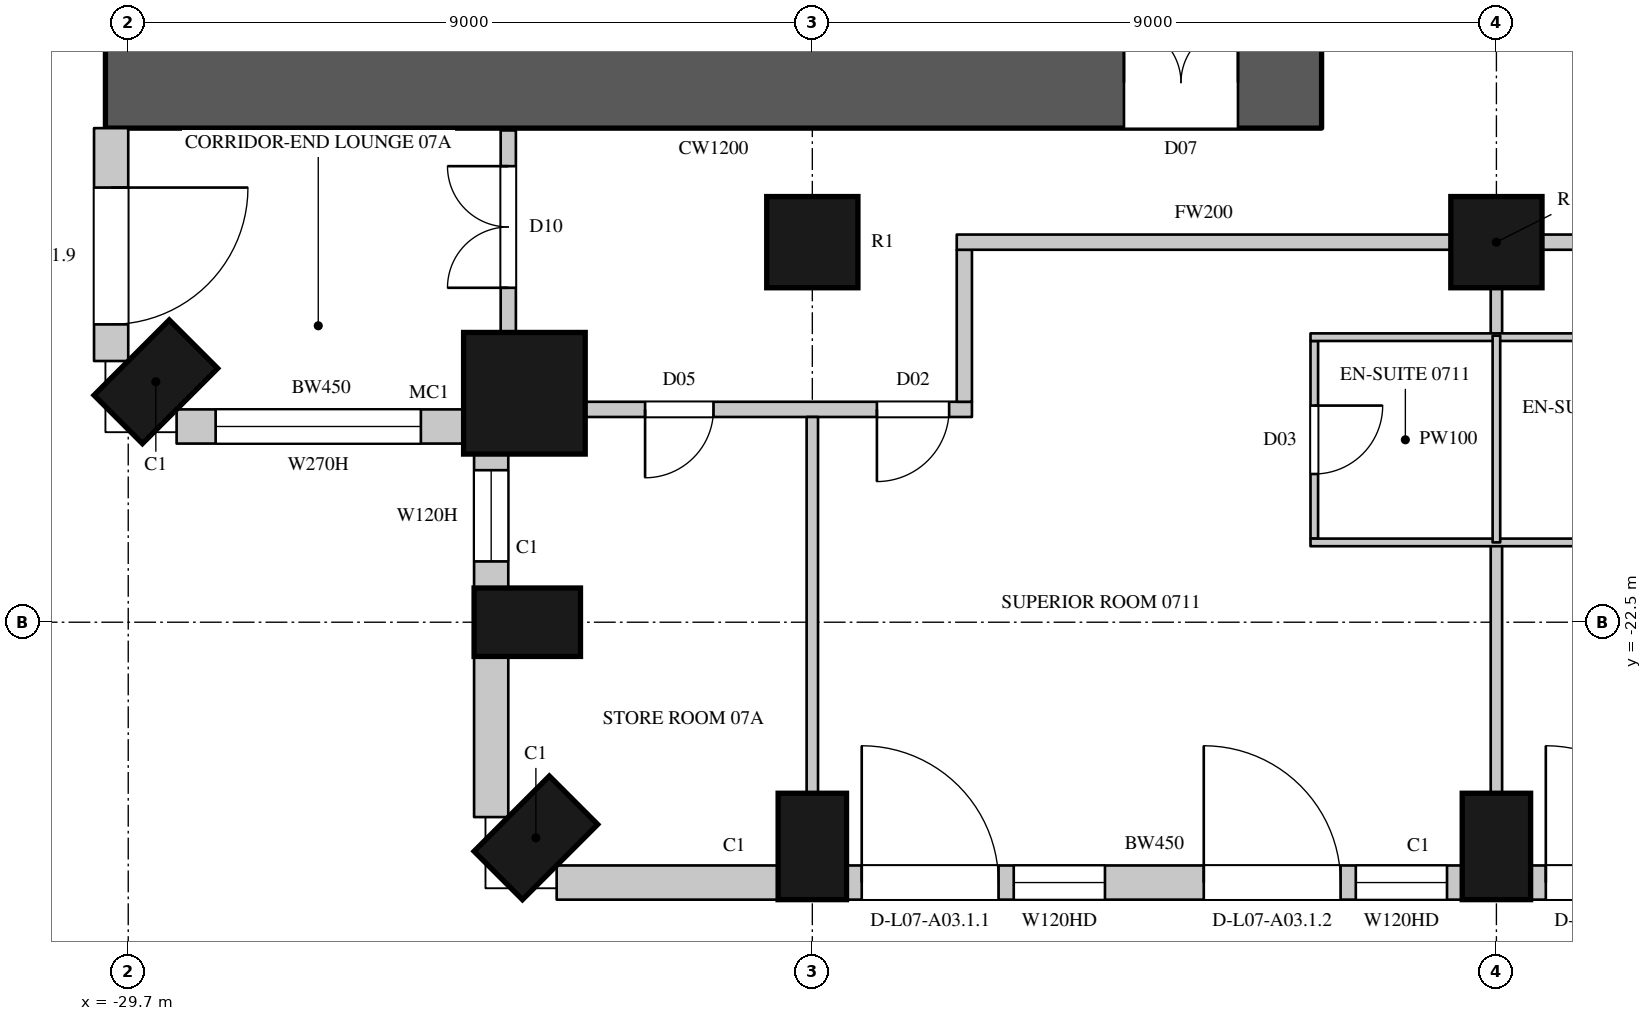
"""IFC4 building model, lengths in metres.
Left out: names, types, materials, properties, quantities, classifications, styles, units other than length and angle.
Written with IfcOpenShell. Run it as: python <this file> out.ifc"""

import sys

from ifc_helpers import new_model, si_unit, direction, frame, frame_2d, origin, origin_2d, place, context, subcontext, project, spatial, rectangle, circle, extrude, element, fill, save


model = new_model("IFC4")
c1 = context("Model", 3, precision=1e-05, world=origin(), true_north=direction((0.0, 1.0)))
c2 = subcontext(c1, "Body", "Model", "MODEL_VIEW")
j1 = project(units=[si_unit("LENGTHUNIT", "METRE"), si_unit("PLANEANGLEUNIT", "RADIAN")], contexts=[c1])
p1 = place(None, origin())
s1 = spatial("IfcSite", under=j1, at=p1, CompositionType="ELEMENT")
p2 = place(p1, origin())
s2 = spatial("IfcBuilding", under=s1, at=p2, CompositionType="ELEMENT")
p3 = place(p2, frame((0.0, 0.0, 55.5)))
s3 = spatial("IfcBuildingStorey", under=s2, at=p3, CompositionType="ELEMENT", Elevation=55.5)
p4 = place(p3, frame((-29.337, -19.337, 0.0), z_axis=(0.0, 0.0, 1.0), x_axis=(0.707106781187, -0.707106781187, 0.0)))
e1 = element("IfcColumn", 1, at=p4, inside=s3, PredefinedType="COLUMN", context=c2, shape_type="SweptSolid", body=[
    extrude(rectangle(XDim=0.9, YDim=1.4, at=origin_2d()), origin(), (0.0, 0.0, 1.0), 3.6),
])
p5 = place(p3, frame((-24.488, -19.488, 0.0), z_axis=(0.0, 0.0, 1.0), x_axis=(1.0, 0.0, 0.0)))
e2 = element("IfcColumn", 2, at=p5, inside=s3, PredefinedType="COLUMN", context=c2, shape_type="SweptSolid", body=[
    extrude(circle(Radius=0.8, at=origin_2d()), origin(), (0.0, 0.0, 1.0), 3.6),
])
for number, where, z_axis, x_axis in (
    (3, (-24.45, -22.5, 0.0), (0.0, 0.0, 1.0), (0.0, -1.0, 0.0)),
    (4, (-24.337, -25.337, 0.0), (0.0, 0.0, 1.0), (0.707, -0.707, 0.0)),
    (5, (-20.7, -25.45, 0.0), (0.0, 0.0, 1.0), (1.0, 0.0, 0.0)),
    (6, (-11.7, -25.45, 0.0), (0.0, 0.0, 1.0), (1.0, 0.0, 0.0)),
):
    element("IfcColumn", number, at=place(p3, frame(where, z_axis=z_axis, x_axis=x_axis)), inside=s3, PredefinedType="COLUMN", context=c2, shape_type="SweptSolid", body=[
        extrude(rectangle(XDim=0.9, YDim=1.4, at=origin_2d()), origin(), (0.0, 0.0, 1.0), 3.6),
    ])
for number, where, z_axis, x_axis in (
    (7, (-20.7, -17.5, 0.0), (0.0, 0.0, 1.0), (1.0, 0.0, 0.0)),
    (8, (-11.7, -17.5, 0.0), (0.0, 0.0, 1.0), (1.0, 0.0, 0.0)),
):
    element("IfcColumn", number, at=place(p3, frame(where, z_axis=z_axis, x_axis=x_axis)), inside=s3, PredefinedType="COLUMN", context=c2, shape_type="SweptSolid", body=[
        extrude(circle(Radius=0.6, at=origin_2d()), origin(), (0.0, 0.0, 1.0), 3.6),
    ])
p6 = place(p3, frame((-29.925, -16.0, 0.0), z_axis=(0.0, 0.0, 1.0), x_axis=(0.0, -1.0, 0.0)))
e9 = element("IfcWall", 9, at=p6, inside=s3, PredefinedType="SOLIDWALL", context=c2, shape_type="SweptSolid", body=[
    extrude(rectangle(XDim=3.064, YDim=0.45, at=frame_2d((1.532, 0.0))), origin(), (0.0, 0.0, 1.0), 3.3),
])
p7 = place(p6, frame((0.782, 0.0, 0.0)))
e10 = element("IfcOpeningElement", 10, at=p7, cuts=e9, PredefinedType="OPENING", context=c2, shape_type="SweptSolid", body=[
    extrude(rectangle(XDim=1.8, YDim=2.4, at=frame_2d((0.9, 1.2))), frame((0.0, 0.235, 0.0), z_axis=(0.0, -1.0, 0.0), x_axis=(1.0, 0.0, 0.0)), (0.0, 0.0, 1.0), 0.47),
])
p8 = place(p3, frame((-29.064, -19.925, 0.0), z_axis=(0.0, 0.0, 1.0), x_axis=(1.0, 0.0, 0.0)))
e11 = element("IfcWall", 11, at=p8, inside=s3, PredefinedType="SOLIDWALL", context=c2, shape_type="SweptSolid", body=[
    extrude(rectangle(XDim=3.805, YDim=0.45, at=frame_2d((1.903, 0.0))), origin(), (0.0, 0.0, 1.0), 3.3),
])
p9 = place(p8, frame((0.514, 0.0, 1.05)))
e12 = element("IfcOpeningElement", 12, at=p9, cuts=e11, PredefinedType="OPENING", context=c2, shape_type="SweptSolid", body=[
    extrude(rectangle(XDim=2.7, YDim=2.0, at=frame_2d((1.35, 1.0))), frame((0.0, 0.235, 0.0), z_axis=(0.0, -1.0, 0.0), x_axis=(1.0, 0.0, 0.0)), (0.0, 0.0, 1.0), 0.47),
])
p10 = place(p3, frame((-24.925, -20.259, 0.0), z_axis=(0.0, 0.0, 1.0), x_axis=(0.0, -1.0, 0.0)))
e13 = element("IfcWall", 13, at=p10, inside=s3, PredefinedType="SOLIDWALL", context=c2, shape_type="SweptSolid", body=[
    extrude(rectangle(XDim=1.792, YDim=0.45, at=frame_2d((0.896, 0.0))), origin(), (0.0, 0.0, 1.0), 3.3),
])
p11 = place(p10, frame((0.241, 0.0, 1.05)))
e14 = element("IfcOpeningElement", 14, at=p11, cuts=e13, PredefinedType="OPENING", context=c2, shape_type="SweptSolid", body=[
    extrude(rectangle(XDim=1.2, YDim=2.0, at=frame_2d((0.6, 1.0))), frame((0.0, 0.235, 0.0), z_axis=(0.0, -1.0, 0.0), x_axis=(1.0, 0.0, 0.0)), (0.0, 0.0, 1.0), 0.47),
])
p12 = place(p3, frame((-24.925, -22.95, 0.0), z_axis=(0.0, 0.0, 1.0), x_axis=(0.0, -1.0, 0.0)))
e15 = element("IfcWall", 15, at=p12, inside=s3, PredefinedType="SOLIDWALL", context=c2, shape_type="SweptSolid", body=[
    extrude(rectangle(XDim=2.114, YDim=0.45, at=frame_2d((1.057, 0.0))), origin(), (0.0, 0.0, 1.0), 3.3),
])
p13 = place(p3, frame((-24.064, -25.925, 0.0), z_axis=(0.0, 0.0, 1.0), x_axis=(1.0, 0.0, 0.0)))
e16 = element("IfcWall", 16, at=p13, inside=s3, PredefinedType="SOLIDWALL", context=c2, shape_type="SweptSolid", body=[
    extrude(rectangle(XDim=2.914, YDim=0.45, at=frame_2d((1.457, 0.0))), origin(), (0.0, 0.0, 1.0), 3.3),
])
p14 = place(p3, frame((-20.25, -25.925, 0.0), z_axis=(0.0, 0.0, 1.0), x_axis=(1.0, 0.0, 0.0)))
e17 = element("IfcWall", 17, at=p14, inside=s3, PredefinedType="SOLIDWALL", context=c2, shape_type="SweptSolid", body=[
    extrude(rectangle(XDim=8.1, YDim=0.45, at=frame_2d((4.05, 0.0))), origin(), (0.0, 0.0, 1.0), 3.3),
])
p15 = place(p14, frame((0.2, 0.0, 0.0)))
e18 = element("IfcOpeningElement", 18, at=p15, cuts=e17, PredefinedType="OPENING", context=c2, shape_type="SweptSolid", body=[
    extrude(rectangle(XDim=1.8, YDim=2.4, at=frame_2d((0.9, 1.2))), frame((0.0, 0.235, 0.0), z_axis=(0.0, -1.0, 0.0), x_axis=(1.0, 0.0, 0.0)), (0.0, 0.0, 1.0), 0.47),
])
p16 = place(p14, frame((2.2, 0.0, 1.05)))
e19 = element("IfcOpeningElement", 19, at=p16, cuts=e17, PredefinedType="OPENING", context=c2, shape_type="SweptSolid", body=[
    extrude(rectangle(XDim=1.2, YDim=2.0, at=frame_2d((0.6, 1.0))), frame((0.0, 0.235, 0.0), z_axis=(0.0, -1.0, 0.0), x_axis=(1.0, 0.0, 0.0)), (0.0, 0.0, 1.0), 0.47),
])
p17 = place(p14, frame((4.7, 0.0, 0.0)))
e20 = element("IfcOpeningElement", 20, at=p17, cuts=e17, PredefinedType="OPENING", context=c2, shape_type="SweptSolid", body=[
    extrude(rectangle(XDim=1.8, YDim=2.4, at=frame_2d((0.9, 1.2))), frame((0.0, 0.235, 0.0), z_axis=(0.0, -1.0, 0.0), x_axis=(1.0, 0.0, 0.0)), (0.0, 0.0, 1.0), 0.47),
])
p18 = place(p14, frame((6.7, 0.0, 1.05)))
e21 = element("IfcOpeningElement", 21, at=p18, cuts=e17, PredefinedType="OPENING", context=c2, shape_type="SweptSolid", body=[
    extrude(rectangle(XDim=1.2, YDim=2.0, at=frame_2d((0.6, 1.0))), frame((0.0, 0.235, 0.0), z_axis=(0.0, -1.0, 0.0), x_axis=(1.0, 0.0, 0.0)), (0.0, 0.0, 1.0), 0.47),
])
p19 = place(p3, frame((-11.25, -25.925, 0.0), z_axis=(0.0, 0.0, 1.0), x_axis=(1.0, 0.0, 0.0)))
e22 = element("IfcWall", 22, at=p19, inside=s3, PredefinedType="SOLIDWALL", context=c2, shape_type="SweptSolid", body=[
    extrude(rectangle(XDim=8.1, YDim=0.45, at=frame_2d((4.05, 0.0))), origin(), (0.0, 0.0, 1.0), 3.3),
])
p20 = place(p19, frame((0.2, 0.0, 0.0)))
e23 = element("IfcOpeningElement", 23, at=p20, cuts=e22, PredefinedType="OPENING", context=c2, shape_type="SweptSolid", body=[
    extrude(rectangle(XDim=1.8, YDim=2.4, at=frame_2d((0.9, 1.2))), frame((0.0, 0.235, 0.0), z_axis=(0.0, -1.0, 0.0), x_axis=(1.0, 0.0, 0.0)), (0.0, 0.0, 1.0), 0.47),
])
p21 = place(p19, frame((2.2, 0.0, 1.05)))
e24 = element("IfcOpeningElement", 24, at=p21, cuts=e22, PredefinedType="OPENING", context=c2, shape_type="SweptSolid", body=[
    extrude(rectangle(XDim=1.2, YDim=2.0, at=frame_2d((0.6, 1.0))), frame((0.0, 0.235, 0.0), z_axis=(0.0, -1.0, 0.0), x_axis=(1.0, 0.0, 0.0)), (0.0, 0.0, 1.0), 0.47),
])
p22 = place(p19, frame((4.7, 0.0, 0.0)))
e25 = element("IfcOpeningElement", 25, at=p22, cuts=e22, PredefinedType="OPENING", context=c2, shape_type="SweptSolid", body=[
    extrude(rectangle(XDim=1.8, YDim=2.4, at=frame_2d((0.9, 1.2))), frame((0.0, 0.235, 0.0), z_axis=(0.0, -1.0, 0.0), x_axis=(1.0, 0.0, 0.0)), (0.0, 0.0, 1.0), 0.47),
])
p23 = place(p19, frame((6.7, 0.0, 1.05)))
e26 = element("IfcOpeningElement", 26, at=p23, cuts=e22, PredefinedType="OPENING", context=c2, shape_type="SweptSolid", body=[
    extrude(rectangle(XDim=1.2, YDim=2.0, at=frame_2d((0.6, 1.0))), frame((0.0, 0.235, 0.0), z_axis=(0.0, -1.0, 0.0), x_axis=(1.0, 0.0, 0.0)), (0.0, 0.0, 1.0), 0.47),
])
p24 = place(p3, frame((-30.0, -15.4, 0.0), z_axis=(0.0, 0.0, 1.0), x_axis=(1.0, 0.0, 0.0)))
e27 = element("IfcWall", 27, at=p24, inside=s3, PredefinedType="SHEAR", context=c2, shape_type="SweptSolid", body=[
    extrude(rectangle(XDim=16.0, YDim=1.2, at=frame_2d((8.0, 0.0))), origin(), (0.0, 0.0, 1.0), 3.6),
])
p25 = place(p24, frame((13.4, 0.0, 0.0)))
e28 = element("IfcOpeningElement", 28, at=p25, cuts=e27, PredefinedType="OPENING", context=c2, shape_type="SweptSolid", body=[
    extrude(rectangle(XDim=1.5, YDim=2.4, at=frame_2d((0.75, 1.2))), frame((0.0, 0.61, 0.0), z_axis=(0.0, -1.0, 0.0), x_axis=(1.0, 0.0, 0.0)), (0.0, 0.0, 1.0), 1.22),
])
p26 = place(p3, frame((-24.7, -18.7, 0.0), z_axis=(0.0, 0.0, 1.0), x_axis=(0.0, 1.0, 0.0)))
e29 = element("IfcWall", 29, at=p26, inside=s3, PredefinedType="PARTITIONING", context=c2, shape_type="SweptSolid", body=[
    extrude(rectangle(XDim=2.67, YDim=0.2, at=frame_2d((1.335, 0.0))), origin(), (0.0, 0.0, 1.0), 3.3),
])
p27 = place(p26, frame((0.6, 0.0, 0.0)))
e30 = element("IfcOpeningElement", 30, at=p27, cuts=e29, PredefinedType="OPENING", context=c2, shape_type="SweptSolid", body=[
    extrude(rectangle(XDim=1.6, YDim=2.4, at=frame_2d((0.8, 1.2))), frame((0.0, 0.11, 0.0), z_axis=(0.0, -1.0, 0.0), x_axis=(1.0, 0.0, 0.0)), (0.0, 0.0, 1.0), 0.22),
])
p28 = place(p3, frame((-23.7, -19.7, 0.0), z_axis=(0.0, 0.0, 1.0), x_axis=(1.0, 0.0, 0.0)))
e31 = element("IfcWall", 31, at=p28, inside=s3, PredefinedType="PARTITIONING", context=c2, shape_type="SweptSolid", body=[
    extrude(rectangle(XDim=5.1, YDim=0.2, at=frame_2d((2.55, 0.0))), origin(), (0.0, 0.0, 1.0), 3.3),
])
p29 = place(p28, frame((0.8, 0.0, 0.0)))
e32 = element("IfcOpeningElement", 32, at=p29, cuts=e31, PredefinedType="OPENING", context=c2, shape_type="SweptSolid", body=[
    extrude(rectangle(XDim=0.9, YDim=2.2, at=frame_2d((0.45, 1.1))), frame((0.0, 0.11, 0.0), z_axis=(0.0, -1.0, 0.0), x_axis=(1.0, 0.0, 0.0)), (0.0, 0.0, 1.0), 0.22),
])
p30 = place(p28, frame((3.85, 0.0, 0.0)))
e33 = element("IfcOpeningElement", 33, at=p30, cuts=e31, PredefinedType="OPENING", context=c2, shape_type="SweptSolid", body=[
    extrude(rectangle(XDim=0.95, YDim=2.2, at=frame_2d((0.475, 1.1))), frame((0.0, 0.11, 0.0), z_axis=(0.0, -1.0, 0.0), x_axis=(1.0, 0.0, 0.0)), (0.0, 0.0, 1.0), 0.22),
])
p31 = place(p3, frame((-18.7, -19.6, 0.0), z_axis=(0.0, 0.0, 1.0), x_axis=(0.0, 1.0, 0.0)))
e34 = element("IfcWall", 34, at=p31, inside=s3, PredefinedType="PARTITIONING", context=c2, shape_type="SweptSolid", body=[
    extrude(rectangle(XDim=2.0, YDim=0.2, at=frame_2d((1.0, 0.0))), origin(), (0.0, 0.0, 1.0), 3.3),
])
p32 = place(p3, frame((-18.8, -17.5, 0.0), z_axis=(0.0, 0.0, 1.0), x_axis=(1.0, 0.0, 0.0)))
e35 = element("IfcWall", 35, at=p32, inside=s3, PredefinedType="PARTITIONING", context=c2, shape_type="SweptSolid", body=[
    extrude(rectangle(XDim=6.5, YDim=0.2, at=frame_2d((3.25, 0.0))), origin(), (0.0, 0.0, 1.0), 2.75),
])
p33 = place(p3, frame((-11.1, -17.5, 0.0), z_axis=(0.0, 0.0, 1.0), x_axis=(1.0, 0.0, 0.0)))
e36 = element("IfcWall", 36, at=p33, inside=s3, PredefinedType="PARTITIONING", context=c2, shape_type="SweptSolid", body=[
    extrude(rectangle(XDim=7.8, YDim=0.2, at=frame_2d((3.9, 0.0))), origin(), (0.0, 0.0, 1.0), 2.75),
])
p34 = place(p33, frame((2.35, 0.0, 0.0)))
e37 = element("IfcOpeningElement", 37, at=p34, cuts=e36, PredefinedType="OPENING", context=c2, shape_type="SweptSolid", body=[
    extrude(rectangle(XDim=0.95, YDim=2.2, at=frame_2d((0.475, 1.1))), frame((0.0, 0.11, 0.0), z_axis=(0.0, -1.0, 0.0), x_axis=(1.0, 0.0, 0.0)), (0.0, 0.0, 1.0), 0.22),
])
p35 = place(p33, frame((5.2, 0.0, 0.0)))
e38 = element("IfcOpeningElement", 38, at=p35, cuts=e36, PredefinedType="OPENING", context=c2, shape_type="SweptSolid", body=[
    extrude(rectangle(XDim=0.95, YDim=2.2, at=frame_2d((0.475, 1.1))), frame((0.0, 0.11, 0.0), z_axis=(0.0, -1.0, 0.0), x_axis=(1.0, 0.0, 0.0)), (0.0, 0.0, 1.0), 0.22),
])
p36 = place(p3, frame((-20.7, -24.75, 0.0), z_axis=(0.0, 0.0, 1.0), x_axis=(0.0, 1.0, 0.0)))
e39 = element("IfcWall", 39, at=p36, inside=s3, PredefinedType="PARTITIONING", context=c2, shape_type="SweptSolid", body=[
    extrude(rectangle(XDim=4.95, YDim=0.15, at=frame_2d((2.475, 0.0))), origin(), (0.0, 0.0, 1.0), 2.75),
])
p37 = place(p3, frame((-11.7, -24.75, 0.0), z_axis=(0.0, 0.0, 1.0), x_axis=(0.0, 1.0, 0.0)))
e40 = element("IfcWall", 40, at=p37, inside=s3, PredefinedType="PARTITIONING", context=c2, shape_type="SweptSolid", body=[
    extrude(rectangle(XDim=3.3, YDim=0.15, at=frame_2d((1.65, 0.0))), origin(), (0.0, 0.0, 1.0), 2.75),
])
p38 = place(p3, frame((-11.7, -18.73, 0.0), z_axis=(0.0, 0.0, 1.0), x_axis=(0.0, 1.0, 0.0)))
e41 = element("IfcWall", 41, at=p38, inside=s3, PredefinedType="PARTITIONING", context=c2, shape_type="SweptSolid", body=[
    extrude(rectangle(XDim=0.63, YDim=0.15, at=frame_2d((0.315, 0.0))), origin(), (0.0, 0.0, 1.0), 2.75),
])
p39 = place(p3, frame((-14.096, -21.4, 0.0), z_axis=(0.0, 0.0, 1.0), x_axis=(0.0, 1.0, 0.0)))
e42 = element("IfcWall", 42, at=p39, inside=s3, PredefinedType="PARTITIONING", context=c2, shape_type="SweptSolid", body=[
    extrude(rectangle(XDim=2.6, YDim=0.1, at=frame_2d((1.3, 0.0))), origin(), (0.0, 0.0, 1.0), 3.3),
])
p40 = place(p39, frame((0.85, 0.0, 0.0)))
e43 = element("IfcOpeningElement", 43, at=p40, cuts=e42, PredefinedType="OPENING", context=c2, shape_type="SweptSolid", body=[
    extrude(rectangle(XDim=0.9, YDim=2.2, at=frame_2d((0.45, 1.1))), frame((0.0, 0.06, 0.0), z_axis=(0.0, -1.0, 0.0), x_axis=(1.0, 0.0, 0.0)), (0.0, 0.0, 1.0), 0.12),
])
p41 = place(p3, frame((-14.146, -21.45, 0.0), z_axis=(0.0, 0.0, 1.0), x_axis=(1.0, 0.0, 0.0)))
e44 = element("IfcWall", 44, at=p41, inside=s3, PredefinedType="PARTITIONING", context=c2, shape_type="SweptSolid", body=[
    extrude(rectangle(XDim=4.892, YDim=0.1, at=frame_2d((2.446, 0.0))), origin(), (0.0, 0.0, 1.0), 3.3),
])
p42 = place(p41, frame((3.75, 0.0, 0.0)))
e45 = element("IfcOpeningElement", 45, at=p42, cuts=e44, PredefinedType="OPENING", context=c2, shape_type="SweptSolid", body=[
    extrude(rectangle(XDim=0.9, YDim=2.2, at=frame_2d((0.45, 1.1))), frame((0.0, 0.06, 0.0), z_axis=(0.0, -1.0, 0.0), x_axis=(1.0, 0.0, 0.0)), (0.0, 0.0, 1.0), 0.12),
])
p43 = place(p3, frame((-14.146, -18.75, 0.0), z_axis=(0.0, 0.0, 1.0), x_axis=(1.0, 0.0, 0.0)))
e46 = element("IfcWall", 46, at=p43, inside=s3, PredefinedType="PARTITIONING", context=c2, shape_type="SweptSolid", body=[
    extrude(rectangle(XDim=4.892, YDim=0.1, at=frame_2d((2.446, 0.0))), origin(), (0.0, 0.0, 1.0), 3.3),
])
p44 = place(p3, frame((-11.7, -21.45, 0.0), z_axis=(0.0, 0.0, 1.0), x_axis=(0.0, 1.0, 0.0)))
e47 = element("IfcWall", 47, at=p44, inside=s3, PredefinedType="PARTITIONING", context=c2, shape_type="SweptSolid", body=[
    extrude(rectangle(XDim=2.72, YDim=0.1, at=frame_2d((1.36, 0.0))), origin(), (0.0, 0.0, 1.0), 2.75),
])
p45 = place(p7, origin())
e48 = element("IfcDoor", 48, at=p45, inside=s3, OperationType="SLIDING_TO_LEFT", PredefinedType="DOOR", context=c2, shape_type="SweptSolid", body=[
    extrude(rectangle(XDim=1.8, YDim=2.4, at=frame_2d((0.9, 1.2))), frame((0.0, 0.13, 0.0), z_axis=(0.0, -1.0, 0.0), x_axis=(1.0, 0.0, 0.0)), (0.0, 0.0, 1.0), 0.05),
])
fill(e10, e48)
p46 = place(p9, origin())
e49 = element("IfcWindow", 49, at=p46, inside=s3, PartitioningType="SINGLE_PANEL", PredefinedType="WINDOW", context=c2, shape_type="SweptSolid", body=[
    extrude(rectangle(XDim=2.7, YDim=2.0, at=frame_2d((1.35, 1.0))), frame((0.0, 0.135, 0.0), z_axis=(0.0, -1.0, 0.0), x_axis=(1.0, 0.0, 0.0)), (0.0, 0.0, 1.0), 0.06),
])
fill(e12, e49)
p47 = place(p11, origin())
e50 = element("IfcWindow", 50, at=p47, inside=s3, PartitioningType="SINGLE_PANEL", PredefinedType="WINDOW", context=c2, shape_type="SweptSolid", body=[
    extrude(rectangle(XDim=1.2, YDim=2.0, at=frame_2d((0.6, 1.0))), frame((0.0, 0.135, 0.0), z_axis=(0.0, -1.0, 0.0), x_axis=(1.0, 0.0, 0.0)), (0.0, 0.0, 1.0), 0.06),
])
fill(e14, e50)
p48 = place(p15, origin())
e51 = element("IfcDoor", 51, at=p48, inside=s3, OperationType="SLIDING_TO_LEFT", PredefinedType="DOOR", context=c2, shape_type="SweptSolid", body=[
    extrude(rectangle(XDim=1.8, YDim=2.4, at=frame_2d((0.9, 1.2))), frame((0.0, 0.13, 0.0), z_axis=(0.0, -1.0, 0.0), x_axis=(1.0, 0.0, 0.0)), (0.0, 0.0, 1.0), 0.05),
])
fill(e18, e51)
p49 = place(p16, origin())
e52 = element("IfcWindow", 52, at=p49, inside=s3, PartitioningType="SINGLE_PANEL", PredefinedType="WINDOW", context=c2, shape_type="SweptSolid", body=[
    extrude(rectangle(XDim=1.2, YDim=2.0, at=frame_2d((0.6, 1.0))), frame((0.0, 0.135, 0.0), z_axis=(0.0, -1.0, 0.0), x_axis=(1.0, 0.0, 0.0)), (0.0, 0.0, 1.0), 0.06),
])
fill(e19, e52)
p50 = place(p17, origin())
e53 = element("IfcDoor", 53, at=p50, inside=s3, OperationType="SLIDING_TO_LEFT", PredefinedType="DOOR", context=c2, shape_type="SweptSolid", body=[
    extrude(rectangle(XDim=1.8, YDim=2.4, at=frame_2d((0.9, 1.2))), frame((0.0, 0.13, 0.0), z_axis=(0.0, -1.0, 0.0), x_axis=(1.0, 0.0, 0.0)), (0.0, 0.0, 1.0), 0.05),
])
fill(e20, e53)
p51 = place(p18, origin())
e54 = element("IfcWindow", 54, at=p51, inside=s3, PartitioningType="SINGLE_PANEL", PredefinedType="WINDOW", context=c2, shape_type="SweptSolid", body=[
    extrude(rectangle(XDim=1.2, YDim=2.0, at=frame_2d((0.6, 1.0))), frame((0.0, 0.135, 0.0), z_axis=(0.0, -1.0, 0.0), x_axis=(1.0, 0.0, 0.0)), (0.0, 0.0, 1.0), 0.06),
])
fill(e21, e54)
p52 = place(p20, origin())
e55 = element("IfcDoor", 55, at=p52, inside=s3, OperationType="SLIDING_TO_LEFT", PredefinedType="DOOR", context=c2, shape_type="SweptSolid", body=[
    extrude(rectangle(XDim=1.8, YDim=2.4, at=frame_2d((0.9, 1.2))), frame((0.0, 0.13, 0.0), z_axis=(0.0, -1.0, 0.0), x_axis=(1.0, 0.0, 0.0)), (0.0, 0.0, 1.0), 0.05),
])
fill(e23, e55)
p53 = place(p29, origin())
e56 = element("IfcDoor", 56, at=p53, inside=s3, OperationType="SINGLE_SWING_RIGHT", PredefinedType="DOOR", context=c2, shape_type="SweptSolid", body=[
    extrude(rectangle(XDim=0.9, YDim=2.2, at=frame_2d((0.45, 1.1))), frame((0.0, 0.025, 0.0), z_axis=(0.0, -1.0, 0.0), x_axis=(1.0, 0.0, 0.0)), (0.0, 0.0, 1.0), 0.05),
])
fill(e32, e56)
p54 = place(p27, origin())
e57 = element("IfcDoor", 57, at=p54, inside=s3, OperationType="DOUBLE_DOOR_SINGLE_SWING", PredefinedType="DOOR", context=c2, shape_type="SweptSolid", body=[
    extrude(rectangle(XDim=1.6, YDim=2.4, at=frame_2d((0.8, 1.2))), frame((0.0, 0.025, 0.0), z_axis=(0.0, -1.0, 0.0), x_axis=(1.0, 0.0, 0.0)), (0.0, 0.0, 1.0), 0.05),
])
fill(e30, e57)
p55 = place(p30, origin())
e58 = element("IfcDoor", 58, at=p55, inside=s3, OperationType="SINGLE_SWING_RIGHT", PredefinedType="DOOR", context=c2, shape_type="SweptSolid", body=[
    extrude(rectangle(XDim=0.95, YDim=2.2, at=frame_2d((0.475, 1.1))), frame((0.0, 0.025, 0.0), z_axis=(0.0, -1.0, 0.0), x_axis=(1.0, 0.0, 0.0)), (0.0, 0.0, 1.0), 0.05),
])
fill(e33, e58)
p56 = place(p40, origin())
e59 = element("IfcDoor", 59, at=p56, inside=s3, OperationType="SINGLE_SWING_LEFT", PredefinedType="DOOR", context=c2, shape_type="SweptSolid", body=[
    extrude(rectangle(XDim=0.9, YDim=2.2, at=frame_2d((0.45, 1.1))), frame((0.0, 0.025, 0.0), z_axis=(0.0, -1.0, 0.0), x_axis=(1.0, 0.0, 0.0)), (0.0, 0.0, 1.0), 0.05),
])
fill(e43, e59)
p57 = place(p25, origin())
e60 = element("IfcDoor", 60, at=p57, inside=s3, OperationType="DOUBLE_DOOR_SINGLE_SWING", PredefinedType="DOOR", context=c2, shape_type="SweptSolid", body=[
    extrude(rectangle(XDim=1.5, YDim=2.4, at=frame_2d((0.75, 1.2))), frame((0.0, 0.025, 0.0), z_axis=(0.0, -1.0, 0.0), x_axis=(1.0, 0.0, 0.0)), (0.0, 0.0, 1.0), 0.05),
])
fill(e28, e60)
save(model, sys.argv[1])
